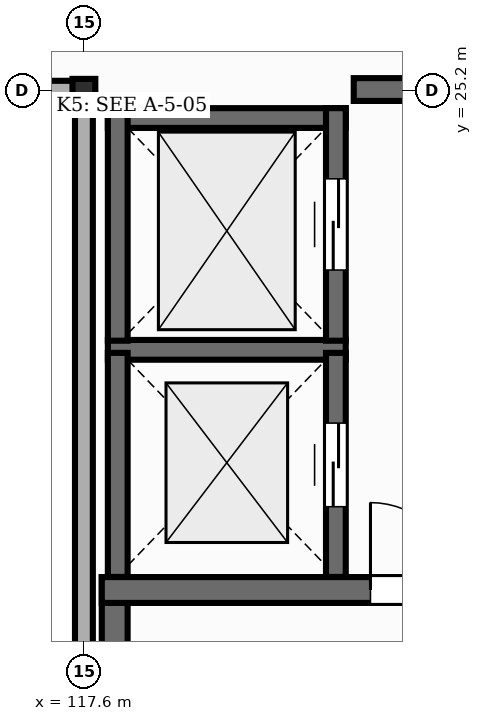
"""IFC4 building model, lengths in metres.
Left out: names, types, materials, properties, quantities, classifications, styles, units other than length and angle.
Written with IfcOpenShell. Run it as: python <this file> out.ifc"""

import sys

from ifc_helpers import new_model, si_unit, direction, frame, frame_2d, origin, origin_2d, place, context, subcontext, project, spatial, rectangle, i_section, extrude, element, fill, save


model = new_model("IFC4")
c1 = context("Model", 3, precision=1e-05, world=origin(), true_north=direction((0.0, 1.0)))
c2 = subcontext(c1, "Body", "Model", "MODEL_VIEW")
j1 = project(units=[si_unit("LENGTHUNIT", "METRE"), si_unit("PLANEANGLEUNIT", "RADIAN")], contexts=[c1])
p1 = place(None, origin())
s1 = spatial("IfcSite", under=j1, at=p1, CompositionType="ELEMENT")
p2 = place(p1, origin())
s2 = spatial("IfcBuilding", under=s1, at=p2, CompositionType="ELEMENT")
p3 = place(p2, frame((0.0, 0.0, 13.95)))
s3 = spatial("IfcBuildingStorey", under=s2, at=p3, CompositionType="ELEMENT", Elevation=13.95)
p4 = place(p3, frame((117.6, 25.2, 0.0), z_axis=(0.0, 0.0, 1.0), x_axis=(1.0, 0.0, 0.0)))
e1 = element("IfcColumn", 1, at=p4, inside=s3, PredefinedType="COLUMN", context=c2, shape_type="SweptSolid", body=[
    extrude(i_section(OverallWidth=0.3, OverallDepth=0.3, WebThickness=0.011, FlangeThickness=0.019, FilletRadius=0.027, at=origin_2d()), origin(), (0.0, 0.0, 1.0), 4.05),
])
p5 = place(p3, frame((109.208, 25.2, 0.0), z_axis=(0.0, 0.0, 1.0), x_axis=(1.0, 0.0, 0.0)))
e2 = element("IfcWall", 2, at=p5, inside=s3, PredefinedType="STANDARD", context=c2, shape_type="SweptSolid", body=[
    extrude(rectangle(XDim=8.384, YDim=0.25, at=frame_2d((4.192, 0.0))), origin(), (0.0, 0.0, 1.0), 3.472),
])
p6 = place(p3, frame((117.6, 25.054, 0.0), z_axis=(0.0, 0.0, 1.0), x_axis=(0.0, -1.0, 0.0)))
e3 = element("IfcWall", 3, at=p6, inside=s3, PredefinedType="STANDARD", context=c2, shape_type="SweptSolid", body=[
    extrude(rectangle(XDim=8.108, YDim=0.235, at=frame_2d((4.054, 0.0))), origin(), (0.0, 0.0, 1.0), 3.487),
])
p7 = place(p3, frame((118.005, 8.805, 0.0), z_axis=(0.0, 0.0, 1.0), x_axis=(0.0, 1.0, 0.0)))
e4 = element("IfcWall", 4, at=p7, inside=s3, PredefinedType="SHEAR", context=c2, shape_type="SweptSolid", body=[
    extrude(rectangle(XDim=9.99, YDim=0.34, at=frame_2d((4.995, 0.0))), origin(), (0.0, 0.0, 1.0), 3.85),
])
p8 = place(p3, frame((117.835, 18.625, 0.0), z_axis=(0.0, 0.0, 1.0), x_axis=(1.0, 0.0, 0.0)))
e5 = element("IfcWall", 5, at=p8, inside=s3, PredefinedType="SHEAR", context=c2, shape_type="SweptSolid", body=[
    extrude(rectangle(XDim=5.25, YDim=0.34, at=frame_2d((2.625, 0.0))), origin(), (0.0, 0.0, 1.0), 3.85),
])
p9 = place(p8, frame((3.535, 0.0, 0.0)))
e6 = element("IfcOpeningElement", 6, at=p9, cuts=e5, PredefinedType="OPENING", context=c2, shape_type="SweptSolid", body=[
    extrude(rectangle(XDim=1.15, YDim=2.15, at=frame_2d((0.575, 1.075))), frame((0.0, 0.18, 0.0), z_axis=(0.0, -1.0, 0.0), x_axis=(1.0, 0.0, 0.0)), (0.0, 0.0, 1.0), 0.36),
])
p10 = place(p3, frame((117.915, 21.785, 0.0), z_axis=(0.0, 0.0, 1.0), x_axis=(1.0, 0.0, 0.0)))
e7 = element("IfcWall", 7, at=p10, inside=s3, PredefinedType="SHEAR", context=c2, shape_type="SweptSolid", body=[
    extrude(rectangle(XDim=3.13, YDim=0.26, at=frame_2d((1.565, 0.0))), origin(), (0.0, 0.0, 1.0), 3.85),
])
p11 = place(p3, frame((118.045, 18.797, 0.0), z_axis=(0.0, 0.0, 1.0), x_axis=(0.0, 1.0, 0.0)))
e8 = element("IfcWall", 8, at=p11, inside=s3, PredefinedType="SHEAR", context=c2, shape_type="SweptSolid", body=[
    extrude(rectangle(XDim=2.948, YDim=0.26, at=frame_2d((1.474, 0.0))), origin(), (0.0, 0.0, 1.0), 3.85),
])
p12 = place(p3, frame((120.915, 18.797, 0.0), z_axis=(0.0, 0.0, 1.0), x_axis=(0.0, 1.0, 0.0)))
e9 = element("IfcWall", 9, at=p12, inside=s3, PredefinedType="SHEAR", context=c2, shape_type="SweptSolid", body=[
    extrude(rectangle(XDim=2.948, YDim=0.26, at=frame_2d((1.474, 0.0))), origin(), (0.0, 0.0, 1.0), 3.85),
])
p13 = place(p12, frame((0.924, 0.0, 0.0)))
e10 = element("IfcOpeningElement", 10, at=p13, cuts=e9, PredefinedType="OPENING", context=c2, shape_type="SweptSolid", body=[
    extrude(rectangle(XDim=1.1, YDim=2.15, at=frame_2d((0.55, 1.075))), frame((0.0, 0.14, 0.0), z_axis=(0.0, -1.0, 0.0), x_axis=(1.0, 0.0, 0.0)), (0.0, 0.0, 1.0), 0.28),
])
p14 = place(p3, frame((117.915, 24.835, 0.0), z_axis=(0.0, 0.0, 1.0), x_axis=(1.0, 0.0, 0.0)))
e11 = element("IfcWall", 11, at=p14, inside=s3, PredefinedType="SHEAR", context=c2, shape_type="SweptSolid", body=[
    extrude(rectangle(XDim=3.13, YDim=0.26, at=frame_2d((1.565, 0.0))), origin(), (0.0, 0.0, 1.0), 3.85),
])
p15 = place(p3, frame((118.045, 21.905, 0.0), z_axis=(0.0, 0.0, 1.0), x_axis=(0.0, 1.0, 0.0)))
e12 = element("IfcWall", 12, at=p15, inside=s3, PredefinedType="SHEAR", context=c2, shape_type="SweptSolid", body=[
    extrude(rectangle(XDim=3.06, YDim=0.26, at=frame_2d((1.53, 0.0))), origin(), (0.0, 0.0, 1.0), 3.85),
])
p16 = place(p3, frame((120.915, 21.905, 0.0), z_axis=(0.0, 0.0, 1.0), x_axis=(0.0, 1.0, 0.0)))
e13 = element("IfcWall", 13, at=p16, inside=s3, PredefinedType="SHEAR", context=c2, shape_type="SweptSolid", body=[
    extrude(rectangle(XDim=3.06, YDim=0.26, at=frame_2d((1.53, 0.0))), origin(), (0.0, 0.0, 1.0), 3.85),
])
p17 = place(p16, frame((0.93, 0.0, 0.0)))
e14 = element("IfcOpeningElement", 14, at=p17, cuts=e13, PredefinedType="OPENING", context=c2, shape_type="SweptSolid", body=[
    extrude(rectangle(XDim=1.2, YDim=2.15, at=frame_2d((0.6, 1.075))), frame((0.0, 0.14, 0.0), z_axis=(0.0, -1.0, 0.0), x_axis=(1.0, 0.0, 0.0)), (0.0, 0.0, 1.0), 0.28),
])
p18 = place(p3, frame((121.15, 25.21, 0.0), z_axis=(0.0, 0.0, 1.0), x_axis=(1.0, 0.0, 0.0)))
e15 = element("IfcWall", 15, at=p18, inside=s3, PredefinedType="SHEAR", context=c2, shape_type="SweptSolid", body=[
    extrude(rectangle(XDim=4.87, YDim=0.3, at=frame_2d((2.435, 0.0))), origin(), (0.0, 0.0, 1.0), 3.85),
])
p19 = place(p9, origin())
e16 = element("IfcDoor", 16, at=p19, inside=s3, OperationType="SINGLE_SWING_LEFT", PredefinedType="DOOR", context=c2, shape_type="SweptSolid", body=[
    extrude(rectangle(XDim=1.15, YDim=2.15, at=frame_2d((0.575, 1.075))), frame((0.0, 0.025, 0.0), z_axis=(0.0, -1.0, 0.0), x_axis=(1.0, 0.0, 0.0)), (0.0, 0.0, 1.0), 0.05),
])
fill(e6, e16)
p20 = place(p13, origin())
e17 = element("IfcDoor", 17, at=p20, inside=s3, OperationType="DOUBLE_DOOR_SLIDING", PredefinedType="DOOR", context=c2, shape_type="SweptSolid", body=[
    extrude(rectangle(XDim=1.1, YDim=2.15, at=frame_2d((0.55, 1.075))), frame((0.0, 0.025, 0.0), z_axis=(0.0, -1.0, 0.0), x_axis=(1.0, 0.0, 0.0)), (0.0, 0.0, 1.0), 0.05),
])
fill(e10, e17)
p21 = place(p17, origin())
e18 = element("IfcDoor", 18, at=p21, inside=s3, OperationType="DOUBLE_DOOR_SLIDING", PredefinedType="DOOR", context=c2, shape_type="SweptSolid", body=[
    extrude(rectangle(XDim=1.2, YDim=2.15, at=frame_2d((0.6, 1.075))), frame((0.0, 0.025, 0.0), z_axis=(0.0, -1.0, 0.0), x_axis=(1.0, 0.0, 0.0)), (0.0, 0.0, 1.0), 0.05),
])
fill(e14, e18)
save(model, sys.argv[1])
